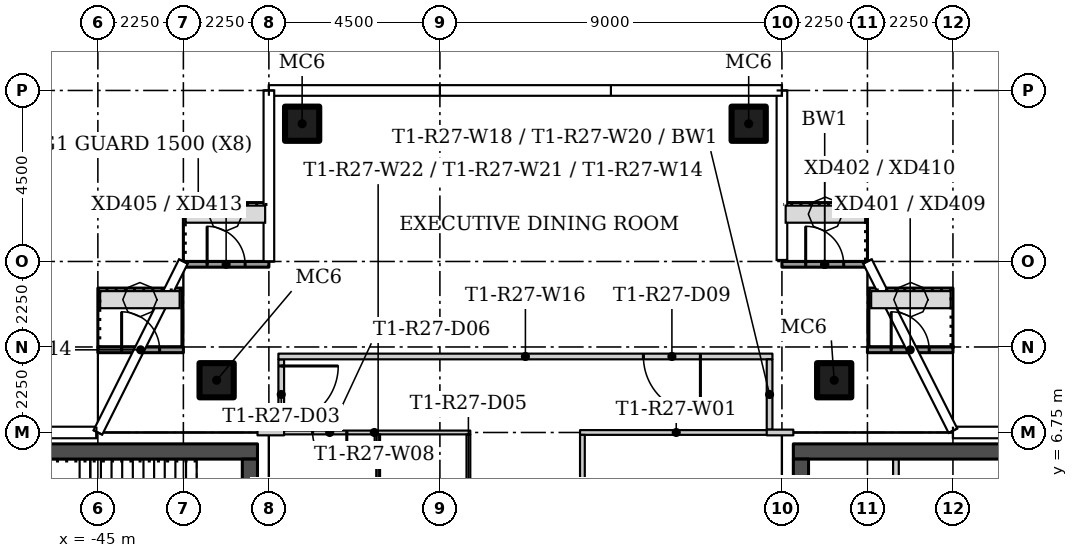
"""IFC4 building model, lengths in metres.
Left out: names, types, materials, properties, quantities, classifications, styles, units other than length and angle.
Written with IfcOpenShell. Run it as: python <this file> out.ifc"""

import sys

from ifc_helpers import new_model, si_unit, direction, frame, frame_2d, origin, origin_2d, place, context, subcontext, project, spatial, rectangle, hollow_rectangle, extrude, element, fill, save


model = new_model("IFC4")
c1 = context("Model", 3, precision=1e-05, world=origin(), true_north=direction((0.0, 1.0)))
c2 = subcontext(c1, "Body", "Model", "MODEL_VIEW")
j1 = project(units=[si_unit("LENGTHUNIT", "METRE"), si_unit("PLANEANGLEUNIT", "RADIAN")], contexts=[c1])
p1 = place(None, origin())
s1 = spatial("IfcSite", under=j1, at=p1, CompositionType="ELEMENT")
p2 = place(p1, origin())
s2 = spatial("IfcBuilding", under=s1, at=p2, CompositionType="ELEMENT")
p3 = place(p2, frame((0.0, 0.0, 249.9)))
s3 = spatial("IfcBuildingStorey", under=s2, at=p3, CompositionType="ELEMENT", Elevation=249.9)
for number, where in (
    (1, (-25.625, 8.125, 0.0)),
    (2, (-41.875, 8.125, 0.0)),
    (3, (-39.625, 14.875, 0.0)),
    (4, (-27.875, 14.875, 0.0)),
):
    element("IfcColumn", number, at=place(p3, frame(where)), inside=s3, PredefinedType="COLUMN", context=c2, shape_type="SweptSolid", body=[
        extrude(hollow_rectangle(XDim=0.9, YDim=0.9, WallThickness=0.036, at=origin_2d()), origin(), (0.0, 0.0, 1.0), 3.55),
    ])
p4 = place(p3, frame((-27.25, 6.75, 0.0), z_axis=(0.0, 0.0, 1.0), x_axis=(-1.0, 0.0, 0.0)))
e5 = element("IfcWall", 5, at=p4, inside=s3, PredefinedType="PARTITIONING", context=c2, shape_type="SweptSolid", body=[
    extrude(rectangle(XDim=5.062, YDim=0.125, at=frame_2d((2.531, 0.0))), origin(), (0.0, 0.0, 1.0), 3.55),
])
p5 = place(p3, frame((-32.25, 6.688, 0.0), z_axis=(0.0, 0.0, 1.0), x_axis=(0.0, -1.0, 0.0)))
e6 = element("IfcWall", 6, at=p5, inside=s3, PredefinedType="PARTITIONING", context=c2, shape_type="SweptSolid", body=[
    extrude(rectangle(XDim=4.175, YDim=0.125, at=frame_2d((2.087, 0.0))), origin(), (0.0, 0.0, 1.0), 3.55),
])
p6 = place(p5, frame((1.637, 0.0, 0.0)))
e7 = element("IfcOpeningElement", 7, at=p6, cuts=e6, PredefinedType="OPENING", context=c2, shape_type="SweptSolid", body=[
    extrude(rectangle(XDim=0.9, YDim=2.1, at=frame_2d((0.45, 1.05))), frame((0.0, 0.073, 0.0), z_axis=(0.0, -1.0, 0.0), x_axis=(1.0, 0.0, 0.0)), (0.0, 0.0, 1.0), 0.145),
])
p7 = place(p3, frame((-35.2, 6.75, 0.0), z_axis=(0.0, 0.0, 1.0), x_axis=(-1.0, 0.0, 0.0)))
e8 = element("IfcWall", 8, at=p7, inside=s3, PredefinedType="PARTITIONING", context=c2, shape_type="SweptSolid", body=[
    extrude(rectangle(XDim=5.05, YDim=0.1, at=frame_2d((2.525, 0.0))), origin(), (0.0, 0.0, 1.0), 3.55),
])
p8 = place(p7, frame((3.25, 0.0, 0.0)))
e9 = element("IfcOpeningElement", 9, at=p8, cuts=e8, PredefinedType="OPENING", context=c2, shape_type="SweptSolid", body=[
    extrude(rectangle(XDim=0.9, YDim=2.1, at=frame_2d((0.45, 1.05))), frame((0.0, 0.06, 0.0), z_axis=(0.0, -1.0, 0.0), x_axis=(1.0, 0.0, 0.0)), (0.0, 0.0, 1.0), 0.12),
])
p9 = place(p3, frame((-35.25, 2.5, 0.0), z_axis=(0.0, 0.0, 1.0), x_axis=(0.0, 1.0, 0.0)))
e10 = element("IfcWall", 10, at=p9, inside=s3, PredefinedType="PARTITIONING", context=c2, shape_type="SweptSolid", body=[
    extrude(rectangle(XDim=4.2, YDim=0.1, at=frame_2d((2.1, 0.0))), origin(), (0.0, 0.0, 1.0), 3.55),
])
p10 = place(p9, frame((1.65, 0.0, 0.0)))
e11 = element("IfcOpeningElement", 11, at=p10, cuts=e10, PredefinedType="OPENING", context=c2, shape_type="SweptSolid", body=[
    extrude(rectangle(XDim=0.9, YDim=2.1, at=frame_2d((0.45, 1.05))), frame((0.0, 0.06, 0.0), z_axis=(0.0, -1.0, 0.0), x_axis=(1.0, 0.0, 0.0)), (0.0, 0.0, 1.0), 0.12),
])
p11 = place(p3, frame((-40.175, 8.675, 0.0), z_axis=(0.0, 0.0, 1.0), x_axis=(0.0, -1.0, 0.0)))
e12 = element("IfcWall", 12, at=p11, inside=s3, PredefinedType="PARTITIONING", context=c2, shape_type="SweptSolid", body=[
    extrude(rectangle(XDim=1.85, YDim=0.15, at=frame_2d((0.925, 0.0))), origin(), (0.0, 0.0, 1.0), 3.55),
])
p12 = place(p11, frame((0.175, 0.0, 0.0)))
e13 = element("IfcOpeningElement", 13, at=p12, cuts=e12, PredefinedType="OPENING", context=c2, shape_type="SweptSolid", body=[
    extrude(rectangle(XDim=1.5, YDim=2.1, at=frame_2d((0.75, 1.05))), frame((0.0, 0.085, 0.0), z_axis=(0.0, -1.0, 0.0), x_axis=(1.0, 0.0, 0.0)), (0.0, 0.0, 1.0), 0.17),
])
p13 = place(p3, frame((-27.25, 8.75, 0.0), z_axis=(0.0, 0.0, 1.0), x_axis=(-1.0, 0.0, 0.0)))
e14 = element("IfcWall", 14, at=p13, inside=s3, PredefinedType="PARTITIONING", context=c2, shape_type="SweptSolid", body=[
    extrude(rectangle(XDim=13.0, YDim=0.15, at=frame_2d((6.5, 0.0))), origin(), (0.0, 0.0, 1.0), 3.55),
])
p14 = place(p13, frame((1.895, 0.0, 0.0)))
e15 = element("IfcOpeningElement", 15, at=p14, cuts=e14, PredefinedType="OPENING", context=c2, shape_type="SweptSolid", body=[
    extrude(rectangle(XDim=1.5, YDim=2.1, at=frame_2d((0.75, 1.05))), frame((0.0, 0.085, 0.0), z_axis=(0.0, -1.0, 0.0), x_axis=(1.0, 0.0, 0.0)), (0.0, 0.0, 1.0), 0.17),
])
p15 = place(p3, frame((-27.325, 6.825, 0.0), z_axis=(0.0, 0.0, 1.0), x_axis=(0.0, 1.0, 0.0)))
e16 = element("IfcWall", 16, at=p15, inside=s3, PredefinedType="PARTITIONING", context=c2, shape_type="SweptSolid", body=[
    extrude(rectangle(XDim=1.85, YDim=0.15, at=frame_2d((0.925, 0.0))), origin(), (0.0, 0.0, 1.0), 3.55),
])
for number, where, z_axis, x_axis in (
    (17, (-26.7, 6.75, 0.0), (0.0, 0.0, 1.0), (-1.0, 0.0, 0.0)),
    (18, (-40.1, 6.75, 0.0), (0.0, 0.0, 1.0), (-1.0, 0.0, 0.0)),
):
    element("IfcWall", number, at=place(p3, frame(where, z_axis=z_axis, x_axis=x_axis)), inside=s3, PredefinedType="PARTITIONING", context=c2, shape_type="SweptSolid", body=[
        extrude(rectangle(XDim=0.7, YDim=0.15, at=frame_2d((0.35, 0.0))), origin(), (0.0, 0.0, 1.0), 3.55),
    ])
p16 = place(p3, frame((-37.625, 2.5, 0.0), z_axis=(0.0, 0.0, 1.0), x_axis=(0.0, 1.0, 0.0)))
e19 = element("IfcWall", 19, at=p16, inside=s3, PredefinedType="PARTITIONING", context=c2, shape_type="SweptSolid", body=[
    extrude(rectangle(XDim=4.2, YDim=0.1, at=frame_2d((2.1, 0.0))), origin(), (0.0, 0.0, 1.0), 3.55),
])
p17 = place(p3, frame((-24.75, 8.925, 0.0)))
e20 = element("IfcWall", 20, at=p17, inside=s3, PredefinedType="SOLIDWALL", context=c2, shape_type="SweptSolid", body=[
    extrude(rectangle(XDim=2.25, YDim=0.15, at=frame_2d((1.125, 0.0))), origin(), (0.0, 0.0, 1.0), 3.45),
])
p18 = place(p17, frame((0.625, 0.0, 0.0)))
e21 = element("IfcOpeningElement", 21, at=p18, cuts=e20, PredefinedType="OPENING", context=c2, shape_type="SweptSolid", body=[
    extrude(rectangle(XDim=1.0, YDim=2.4, at=frame_2d((0.5, 1.2))), frame((0.0, 0.085, 0.0), z_axis=(0.0, -1.0, 0.0), x_axis=(1.0, 0.0, 0.0)), (0.0, 0.0, 1.0), 0.17),
])
p19 = place(p3, frame((-27.0, 11.175, 0.0)))
e22 = element("IfcWall", 22, at=p19, inside=s3, PredefinedType="SOLIDWALL", context=c2, shape_type="SweptSolid", body=[
    extrude(rectangle(XDim=2.25, YDim=0.15, at=frame_2d((1.125, 0.0))), origin(), (0.0, 0.0, 1.0), 3.45),
])
p20 = place(p19, frame((0.625, 0.0, 0.0)))
e23 = element("IfcOpeningElement", 23, at=p20, cuts=e22, PredefinedType="OPENING", context=c2, shape_type="SweptSolid", body=[
    extrude(rectangle(XDim=1.0, YDim=2.4, at=frame_2d((0.5, 1.2))), frame((0.0, 0.085, 0.0), z_axis=(0.0, -1.0, 0.0), x_axis=(1.0, 0.0, 0.0)), (0.0, 0.0, 1.0), 0.17),
])
p21 = place(p3, frame((-42.75, 11.175, 0.0)))
e24 = element("IfcWall", 24, at=p21, inside=s3, PredefinedType="SOLIDWALL", context=c2, shape_type="SweptSolid", body=[
    extrude(rectangle(XDim=2.25, YDim=0.15, at=frame_2d((1.125, 0.0))), origin(), (0.0, 0.0, 1.0), 3.45),
])
p22 = place(p21, frame((0.625, 0.0, 0.0)))
e25 = element("IfcOpeningElement", 25, at=p22, cuts=e24, PredefinedType="OPENING", context=c2, shape_type="SweptSolid", body=[
    extrude(rectangle(XDim=1.0, YDim=2.4, at=frame_2d((0.5, 1.2))), frame((0.0, 0.085, 0.0), z_axis=(0.0, -1.0, 0.0), x_axis=(1.0, 0.0, 0.0)), (0.0, 0.0, 1.0), 0.17),
])
p23 = place(p3, frame((-45.0, 8.925, 0.0)))
e26 = element("IfcWall", 26, at=p23, inside=s3, PredefinedType="SOLIDWALL", context=c2, shape_type="SweptSolid", body=[
    extrude(rectangle(XDim=2.25, YDim=0.15, at=frame_2d((1.125, 0.0))), origin(), (0.0, 0.0, 1.0), 3.45),
])
p24 = place(p23, frame((0.625, 0.0, 0.0)))
e27 = element("IfcOpeningElement", 27, at=p24, cuts=e26, PredefinedType="OPENING", context=c2, shape_type="SweptSolid", body=[
    extrude(rectangle(XDim=1.0, YDim=2.4, at=frame_2d((0.5, 1.2))), frame((0.0, 0.085, 0.0), z_axis=(0.0, -1.0, 0.0), x_axis=(1.0, 0.0, 0.0)), (0.0, 0.0, 1.0), 0.17),
])
p25 = place(p3, frame((-26.7, 6.25, 0.0)))
e28 = element("IfcWall", 28, at=p25, inside=s3, PredefinedType="SHEAR", context=c2, shape_type="SweptSolid", body=[
    extrude(rectangle(XDim=12.9, YDim=0.4, at=frame_2d((6.45, 0.0))), origin(), (0.0, 0.0, 1.0), 3.55),
])
p26 = place(p3, frame((-26.5, 6.05, 0.0), z_axis=(0.0, 0.0, 1.0), x_axis=(0.0, -1.0, 0.0)))
e29 = element("IfcWall", 29, at=p26, inside=s3, PredefinedType="SHEAR", context=c2, shape_type="SweptSolid", body=[
    extrude(rectangle(XDim=12.1, YDim=0.4, at=frame_2d((6.05, 0.0))), origin(), (0.0, 0.0, 1.0), 3.55),
])
p27 = place(p26, frame((3.9, 0.0, 0.0)))
e30 = element("IfcOpeningElement", 30, at=p27, cuts=e29, PredefinedType="OPENING", context=c2, shape_type="SweptSolid", body=[
    extrude(rectangle(XDim=1.8, YDim=2.4, at=frame_2d((0.9, 1.2))), frame((0.0, 0.21, 0.0), z_axis=(0.0, -1.0, 0.0), x_axis=(1.0, 0.0, 0.0)), (0.0, 0.0, 1.0), 0.42),
])
p28 = place(p3, frame((-24.0, 3.25, 0.0), z_axis=(0.0, 0.0, 1.0), x_axis=(0.0, 1.0, 0.0)))
e31 = element("IfcWall", 31, at=p28, inside=s3, PredefinedType="PARTITIONING", context=c2, shape_type="SweptSolid", body=[
    extrude(rectangle(XDim=2.8, YDim=0.15, at=frame_2d((1.4, 0.0))), origin(), (0.0, 0.0, 1.0), 3.55),
])
p29 = place(p3, frame((-40.8, 6.25, 0.0), z_axis=(0.0, 0.0, 1.0), x_axis=(-1.0, 0.0, 0.0)))
e32 = element("IfcWall", 32, at=p29, inside=s3, PredefinedType="SHEAR", context=c2, shape_type="SweptSolid", body=[
    extrude(rectangle(XDim=12.9, YDim=0.4, at=frame_2d((6.45, 0.0))), origin(), (0.0, 0.0, 1.0), 3.55),
])
p30 = place(p3, frame((-41.0, -6.05, 0.0), z_axis=(0.0, 0.0, 1.0), x_axis=(0.0, 1.0, 0.0)))
e33 = element("IfcWall", 33, at=p30, inside=s3, PredefinedType="SHEAR", context=c2, shape_type="SweptSolid", body=[
    extrude(rectangle(XDim=12.1, YDim=0.4, at=frame_2d((6.05, 0.0))), origin(), (0.0, 0.0, 1.0), 3.55),
])
p31 = place(p30, frame((6.4, 0.0, 0.0)))
e34 = element("IfcOpeningElement", 34, at=p31, cuts=e33, PredefinedType="OPENING", context=c2, shape_type="SweptSolid", body=[
    extrude(rectangle(XDim=1.8, YDim=2.4, at=frame_2d((0.9, 1.2))), frame((0.0, 0.21, 0.0), z_axis=(0.0, -1.0, 0.0), x_axis=(1.0, 0.0, 0.0)), (0.0, 0.0, 1.0), 0.42),
])
p32 = place(p12, origin())
e35 = element("IfcDoor", 35, at=p32, inside=s3, OperationType="DOUBLE_DOOR_SINGLE_SWING", PredefinedType="DOOR", context=c2, shape_type="SweptSolid", body=[
    extrude(rectangle(XDim=1.5, YDim=2.1, at=frame_2d((0.75, 1.05))), frame((0.0, 0.025, 0.0), z_axis=(0.0, -1.0, 0.0), x_axis=(1.0, 0.0, 0.0)), (0.0, 0.0, 1.0), 0.05),
])
fill(e13, e35)
p33 = place(p8, origin())
e36 = element("IfcDoor", 36, at=p33, inside=s3, OperationType="SINGLE_SWING_LEFT", PredefinedType="DOOR", context=c2, shape_type="SweptSolid", body=[
    extrude(rectangle(XDim=0.9, YDim=2.1, at=frame_2d((0.45, 1.05))), frame((0.0, 0.025, 0.0), z_axis=(0.0, -1.0, 0.0), x_axis=(1.0, 0.0, 0.0)), (0.0, 0.0, 1.0), 0.05),
])
fill(e9, e36)
p34 = place(p14, origin())
e37 = element("IfcDoor", 37, at=p34, inside=s3, OperationType="DOUBLE_DOOR_SINGLE_SWING", PredefinedType="DOOR", context=c2, shape_type="SweptSolid", body=[
    extrude(rectangle(XDim=1.5, YDim=2.1, at=frame_2d((0.75, 1.05))), frame((0.0, 0.025, 0.0), z_axis=(0.0, -1.0, 0.0), x_axis=(1.0, 0.0, 0.0)), (0.0, 0.0, 1.0), 0.05),
])
fill(e15, e37)
p35 = place(p18, origin())
e38 = element("IfcDoor", 38, at=p35, inside=s3, OperationType="SINGLE_SWING_RIGHT", PredefinedType="DOOR", context=c2, shape_type="SweptSolid", body=[
    extrude(rectangle(XDim=1.0, YDim=2.4, at=frame_2d((0.5, 1.2))), frame((0.0, 0.025, 0.0), z_axis=(0.0, -1.0, 0.0), x_axis=(1.0, 0.0, 0.0)), (0.0, 0.0, 1.0), 0.05),
])
fill(e21, e38)
p36 = place(p20, origin())
e39 = element("IfcDoor", 39, at=p36, inside=s3, OperationType="SINGLE_SWING_LEFT", PredefinedType="DOOR", context=c2, shape_type="SweptSolid", body=[
    extrude(rectangle(XDim=1.0, YDim=2.4, at=frame_2d((0.5, 1.2))), frame((0.0, 0.025, 0.0), z_axis=(0.0, -1.0, 0.0), x_axis=(1.0, 0.0, 0.0)), (0.0, 0.0, 1.0), 0.05),
])
fill(e23, e39)
p37 = place(p22, origin())
e40 = element("IfcDoor", 40, at=p37, inside=s3, OperationType="SINGLE_SWING_LEFT", PredefinedType="DOOR", context=c2, shape_type="SweptSolid", body=[
    extrude(rectangle(XDim=1.0, YDim=2.4, at=frame_2d((0.5, 1.2))), frame((0.0, 0.025, 0.0), z_axis=(0.0, -1.0, 0.0), x_axis=(1.0, 0.0, 0.0)), (0.0, 0.0, 1.0), 0.05),
])
fill(e25, e40)
p38 = place(p24, origin())
e41 = element("IfcDoor", 41, at=p38, inside=s3, OperationType="SINGLE_SWING_RIGHT", PredefinedType="DOOR", context=c2, shape_type="SweptSolid", body=[
    extrude(rectangle(XDim=1.0, YDim=2.4, at=frame_2d((0.5, 1.2))), frame((0.0, 0.025, 0.0), z_axis=(0.0, -1.0, 0.0), x_axis=(1.0, 0.0, 0.0)), (0.0, 0.0, 1.0), 0.05),
])
fill(e27, e41)
save(model, sys.argv[1])
